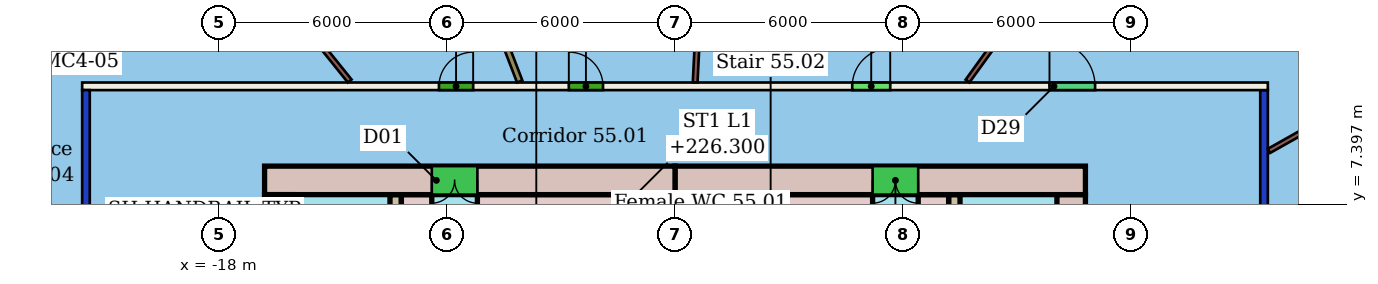
"""IFC4 building model, lengths in metres.
Left out: names, types, materials, properties, quantities, classifications, styles, units other than length and angle.
Written with IfcOpenShell. Run it as: python <this file> out.ifc"""

import sys

from ifc_helpers import new_model, si_unit, direction, frame, frame_2d, origin, place, context, subcontext, project, spatial, rectangle, extrude, element, fill, save


model = new_model("IFC4")
c1 = context("Model", 3, precision=1e-05, world=origin(), true_north=direction((0.0, 1.0)))
c2 = subcontext(c1, "Body", "Model", "MODEL_VIEW")
j1 = project(units=[si_unit("LENGTHUNIT", "METRE"), si_unit("PLANEANGLEUNIT", "RADIAN")], contexts=[c1])
p1 = place(None, origin())
s1 = spatial("IfcSite", under=j1, at=p1, CompositionType="ELEMENT")
p2 = place(p1, origin())
s2 = spatial("IfcBuilding", under=s1, at=p2, CompositionType="ELEMENT")
p3 = place(p2, frame((0.0, 0.0, 224.5)))
s3 = spatial("IfcBuildingStorey", under=s2, at=p3, CompositionType="ELEMENT", Elevation=224.5)
p4 = place(p3, frame((-21.5, -10.4, 0.0), z_axis=(0.0, 0.0, 1.0), x_axis=(0.0, 1.0, 0.0)))
e1 = element("IfcWall", 1, at=p4, inside=s3, PredefinedType="PARTITIONING", context=c2, shape_type="SweptSolid", body=[
    extrude(rectangle(XDim=20.8, YDim=0.2, at=frame_2d((10.4, 0.0))), origin(), (0.0, 0.0, 1.0), 3.05),
])
p5 = place(p4, frame((14.754, 0.0, 0.0)))
e2 = element("IfcOpeningElement", 2, at=p5, cuts=e1, PredefinedType="OPENING", context=c2, shape_type="SweptSolid", body=[
    extrude(rectangle(XDim=1.0, YDim=2.4, at=frame_2d((0.5, 1.2))), frame((0.0, 0.11, 0.0), z_axis=(0.0, -1.0, 0.0), x_axis=(1.0, 0.0, 0.0)), (0.0, 0.0, 1.0), 0.22),
])
p6 = place(p4, frame((7.034, 0.0, 0.0)))
e3 = element("IfcOpeningElement", 3, at=p6, cuts=e1, PredefinedType="OPENING", context=c2, shape_type="SweptSolid", body=[
    extrude(rectangle(XDim=1.8, YDim=2.4, at=frame_2d((0.9, 1.2))), frame((0.0, 0.11, 0.0), z_axis=(0.0, -1.0, 0.0), x_axis=(1.0, 0.0, 0.0)), (0.0, 0.0, 1.0), 0.22),
])
p7 = place(p3, frame((-21.6, 10.5, 0.0), z_axis=(0.0, 0.0, 1.0), x_axis=(1.0, 0.0, 0.0)))
e4 = element("IfcWall", 4, at=p7, inside=s3, PredefinedType="PARTITIONING", context=c2, shape_type="SweptSolid", body=[
    extrude(rectangle(XDim=31.2, YDim=0.2, at=frame_2d((15.6, 0.0))), origin(), (0.0, 0.0, 1.0), 3.45),
])
p8 = place(p7, frame((20.263, 0.0, 0.0)))
e5 = element("IfcOpeningElement", 5, at=p8, cuts=e4, PredefinedType="OPENING", context=c2, shape_type="SweptSolid", body=[
    extrude(rectangle(XDim=1.0, YDim=2.4, at=frame_2d((0.5, 1.2))), frame((0.0, 0.11, 0.0), z_axis=(0.0, -1.0, 0.0), x_axis=(1.0, 0.0, 0.0)), (0.0, 0.0, 1.0), 0.22),
])
p9 = place(p7, frame((12.806, 0.0, 0.0)))
e6 = element("IfcOpeningElement", 6, at=p9, cuts=e4, PredefinedType="OPENING", context=c2, shape_type="SweptSolid", body=[
    extrude(rectangle(XDim=0.9, YDim=2.1, at=frame_2d((0.45, 1.05))), frame((0.0, 0.11, 0.0), z_axis=(0.0, -1.0, 0.0), x_axis=(1.0, 0.0, 0.0)), (0.0, 0.0, 1.0), 0.22),
])
p10 = place(p7, frame((9.389, 0.0, 0.0)))
e7 = element("IfcOpeningElement", 7, at=p10, cuts=e4, PredefinedType="OPENING", context=c2, shape_type="SweptSolid", body=[
    extrude(rectangle(XDim=0.9, YDim=2.1, at=frame_2d((0.45, 1.05))), frame((0.0, 0.11, 0.0), z_axis=(0.0, -1.0, 0.0), x_axis=(1.0, 0.0, 0.0)), (0.0, 0.0, 1.0), 0.22),
])
p11 = place(p7, frame((25.454, 0.0, 0.0)))
e8 = element("IfcOpeningElement", 8, at=p11, cuts=e4, PredefinedType="OPENING", context=c2, shape_type="SweptSolid", body=[
    extrude(rectangle(XDim=1.2, YDim=2.4, at=frame_2d((0.6, 1.2))), frame((0.0, 0.11, 0.0), z_axis=(0.0, -1.0, 0.0), x_axis=(1.0, 0.0, 0.0)), (0.0, 0.0, 1.0), 0.22),
])
p12 = place(p3, frame((9.5, 10.4, 0.0), z_axis=(0.0, 0.0, 1.0), x_axis=(0.0, -1.0, 0.0)))
e9 = element("IfcWall", 9, at=p12, inside=s3, PredefinedType="PARTITIONING", context=c2, shape_type="SweptSolid", body=[
    extrude(rectangle(XDim=20.8, YDim=0.2, at=frame_2d((10.4, 0.0))), origin(), (0.0, 0.0, 1.0), 3.05),
])
p13 = place(p12, frame((13.631, 0.0, 0.0)))
e10 = element("IfcOpeningElement", 10, at=p13, cuts=e9, PredefinedType="OPENING", context=c2, shape_type="SweptSolid", body=[
    extrude(rectangle(XDim=0.9, YDim=2.1, at=frame_2d((0.45, 1.05))), frame((0.0, 0.11, 0.0), z_axis=(0.0, -1.0, 0.0), x_axis=(1.0, 0.0, 0.0)), (0.0, 0.0, 1.0), 0.22),
])
p14 = place(p12, frame((7.823, 0.0, 0.0)))
e11 = element("IfcOpeningElement", 11, at=p14, cuts=e9, PredefinedType="OPENING", context=c2, shape_type="SweptSolid", body=[
    extrude(rectangle(XDim=1.5, YDim=2.1, at=frame_2d((0.75, 1.05))), frame((0.0, 0.11, 0.0), z_axis=(0.0, -1.0, 0.0), x_axis=(1.0, 0.0, 0.0)), (0.0, 0.0, 1.0), 0.22),
])
p15 = place(p3, frame((9.588, 21.542, 0.0), z_axis=(0.0, 0.0, 1.0), x_axis=(-0.586235299026, -0.810140836013, 0.0)))
e12 = element("IfcWall", 12, at=p15, inside=s3, PredefinedType="PARTITIONING", context=c2, shape_type="SweptSolid", body=[
    extrude(rectangle(XDim=13.461, YDim=0.125, at=frame_2d((6.73, 0.0))), origin(), (0.0, 0.0, 1.0), 3.45),
])
p16 = place(p3, frame((-4.783, 24.319, 0.0), z_axis=(0.0, 0.0, 1.0), x_axis=(-0.049956237306, -0.998751407686, 0.0)))
e13 = element("IfcWall", 13, at=p16, inside=s3, PredefinedType="PARTITIONING", context=c2, shape_type="SweptSolid", body=[
    extrude(rectangle(XDim=13.733, YDim=0.125, at=frame_2d((6.866, 0.0))), origin(), (0.0, 0.0, 1.0), 3.45),
])
p17 = place(p3, frame((-14.097, 21.057, 0.0), z_axis=(0.0, 0.0, 1.0), x_axis=(0.358907338181, -0.93337319578, 0.0)))
e14 = element("IfcWall", 14, at=p17, inside=s3, PredefinedType="PARTITIONING", context=c2, shape_type="SweptSolid", body=[
    extrude(rectangle(XDim=11.174, YDim=0.15, at=frame_2d((5.587, 0.0))), origin(), (0.0, 0.0, 1.0), 3.45),
])
p18 = place(p3, frame((-19.706, 17.038, 0.0), z_axis=(0.0, 0.0, 1.0), x_axis=(0.626795529624, -0.77918378066, 0.0)))
e15 = element("IfcWall", 15, at=p18, inside=s3, PredefinedType="PARTITIONING", context=c2, shape_type="SweptSolid", body=[
    extrude(rectangle(XDim=8.212, YDim=0.125, at=frame_2d((4.106, 0.0))), origin(), (0.0, 0.0, 1.0), 3.45),
])
p19 = place(p3, frame((16.664, 12.761, 0.0), z_axis=(0.0, 0.0, 1.0), x_axis=(-0.871369479299, -0.490627384627, 0.0)))
e16 = element("IfcWall", 16, at=p19, inside=s3, PredefinedType="PARTITIONING", context=c2, shape_type="SweptSolid", body=[
    extrude(rectangle(XDim=8.072, YDim=0.125, at=frame_2d((4.036, 0.0))), origin(), (0.0, 0.0, 1.0), 3.45),
])
p20 = place(p3, frame((4.8, 8.025, 0.0), z_axis=(0.0, 0.0, 1.0), x_axis=(-1.0, 0.0, 0.0)))
e17 = element("IfcWall", 17, at=p20, inside=s3, PredefinedType="SHEAR", context=c2, shape_type="SweptSolid", body=[
    extrude(rectangle(XDim=10.8, YDim=0.75, at=frame_2d((5.4, 0.0))), origin(), (0.0, 0.0, 1.0), 3.3),
])
p21 = place(p20, frame((4.4, 0.0, 0.0)))
e18 = element("IfcOpeningElement", 18, at=p21, cuts=e17, PredefinedType="OPENING", context=c2, shape_type="SweptSolid", body=[
    extrude(rectangle(XDim=1.2, YDim=2.1, at=frame_2d((0.6, 1.05))), frame((0.0, 0.385, 0.0), z_axis=(0.0, -1.0, 0.0), x_axis=(1.0, 0.0, 0.0)), (0.0, 0.0, 1.0), 0.77),
])
p22 = place(p3, frame((-6.0, 8.025, 0.0), z_axis=(0.0, 0.0, 1.0), x_axis=(-1.0, 0.0, 0.0)))
e19 = element("IfcWall", 19, at=p22, inside=s3, PredefinedType="SHEAR", context=c2, shape_type="SweptSolid", body=[
    extrude(rectangle(XDim=10.8, YDim=0.75, at=frame_2d((5.4, 0.0))), origin(), (0.0, 0.0, 1.0), 3.3),
])
p23 = place(p22, frame((5.2, 0.0, 0.0)))
e20 = element("IfcOpeningElement", 20, at=p23, cuts=e19, PredefinedType="OPENING", context=c2, shape_type="SweptSolid", body=[
    extrude(rectangle(XDim=1.2, YDim=2.1, at=frame_2d((0.6, 1.05))), frame((0.0, 0.385, 0.0), z_axis=(0.0, -1.0, 0.0), x_axis=(1.0, 0.0, 0.0)), (0.0, 0.0, 1.0), 0.77),
])
p24 = place(p3, frame((-16.425, 7.65, 0.0), z_axis=(0.0, 0.0, 1.0), x_axis=(0.0, -1.0, 0.0)))
e21 = element("IfcWall", 21, at=p24, inside=s3, PredefinedType="SHEAR", context=c2, shape_type="SweptSolid", body=[
    extrude(rectangle(XDim=15.3, YDim=0.75, at=frame_2d((7.65, 0.0))), origin(), (0.0, 0.0, 1.0), 3.3),
])
p25 = place(p24, frame((11.25, 0.0, 0.0)))
e22 = element("IfcOpeningElement", 22, at=p25, cuts=e21, PredefinedType="OPENING", context=c2, shape_type="SweptSolid", body=[
    extrude(rectangle(XDim=1.2, YDim=2.1, at=frame_2d((0.6, 1.05))), frame((0.0, 0.385, 0.0), z_axis=(0.0, -1.0, 0.0), x_axis=(1.0, 0.0, 0.0)), (0.0, 0.0, 1.0), 0.77),
])
p26 = place(p24, frame((2.85, 0.0, 0.0)))
e23 = element("IfcOpeningElement", 23, at=p26, cuts=e21, PredefinedType="OPENING", context=c2, shape_type="SweptSolid", body=[
    extrude(rectangle(XDim=1.2, YDim=2.1, at=frame_2d((0.6, 1.05))), frame((0.0, 0.385, 0.0), z_axis=(0.0, -1.0, 0.0), x_axis=(1.0, 0.0, 0.0)), (0.0, 0.0, 1.0), 0.77),
])
p27 = place(p3, frame((4.425, -7.65, 0.0), z_axis=(0.0, 0.0, 1.0), x_axis=(0.0, 1.0, 0.0)))
e24 = element("IfcWall", 24, at=p27, inside=s3, PredefinedType="SHEAR", context=c2, shape_type="SweptSolid", body=[
    extrude(rectangle(XDim=15.3, YDim=0.75, at=frame_2d((7.65, 0.0))), origin(), (0.0, 0.0, 1.0), 3.3),
])
p28 = place(p27, frame((2.85, 0.0, 0.0)))
e25 = element("IfcOpeningElement", 25, at=p28, cuts=e24, PredefinedType="OPENING", context=c2, shape_type="SweptSolid", body=[
    extrude(rectangle(XDim=1.2, YDim=2.1, at=frame_2d((0.6, 1.05))), frame((0.0, 0.385, 0.0), z_axis=(0.0, -1.0, 0.0), x_axis=(1.0, 0.0, 0.0)), (0.0, 0.0, 1.0), 0.77),
])
p29 = place(p27, frame((11.25, 0.0, 0.0)))
e26 = element("IfcOpeningElement", 26, at=p29, cuts=e24, PredefinedType="OPENING", context=c2, shape_type="SweptSolid", body=[
    extrude(rectangle(XDim=1.2, YDim=2.1, at=frame_2d((0.6, 1.05))), frame((0.0, 0.385, 0.0), z_axis=(0.0, -1.0, 0.0), x_axis=(1.0, 0.0, 0.0)), (0.0, 0.0, 1.0), 0.77),
])
p30 = place(p3, frame((-13.35, 7.65, 0.0), z_axis=(0.0, 0.0, 1.0), x_axis=(0.0, -1.0, 0.0)))
e27 = element("IfcWall", 27, at=p30, inside=s3, PredefinedType="SHEAR", context=c2, shape_type="SweptSolid", body=[
    extrude(rectangle(XDim=15.3, YDim=0.3, at=frame_2d((7.65, 0.0))), origin(), (0.0, 0.0, 1.0), 3.3),
])
p31 = place(p30, frame((6.9, 0.0, 0.0)))
e28 = element("IfcOpeningElement", 28, at=p31, cuts=e27, PredefinedType="OPENING", context=c2, shape_type="SweptSolid", body=[
    extrude(rectangle(XDim=1.5, YDim=2.1, at=frame_2d((0.75, 1.05))), frame((0.0, 0.16, 0.0), z_axis=(0.0, -1.0, 0.0), x_axis=(1.0, 0.0, 0.0)), (0.0, 0.0, 1.0), 0.32),
])
p32 = place(p3, frame((1.35, -7.65, 0.0), z_axis=(0.0, 0.0, 1.0), x_axis=(0.0, 1.0, 0.0)))
e29 = element("IfcWall", 29, at=p32, inside=s3, PredefinedType="SHEAR", context=c2, shape_type="SweptSolid", body=[
    extrude(rectangle(XDim=15.3, YDim=0.3, at=frame_2d((7.65, 0.0))), origin(), (0.0, 0.0, 1.0), 3.3),
])
p33 = place(p32, frame((1.56, 0.0, 0.0)))
e30 = element("IfcOpeningElement", 30, at=p33, cuts=e29, PredefinedType="OPENING", context=c2, shape_type="SweptSolid", body=[
    extrude(rectangle(XDim=1.0, YDim=2.1, at=frame_2d((0.5, 1.05))), frame((0.0, 0.16, 0.0), z_axis=(0.0, -1.0, 0.0), x_axis=(1.0, 0.0, 0.0)), (0.0, 0.0, 1.0), 0.32),
])
p34 = place(p32, frame((6.9, 0.0, 0.0)))
e31 = element("IfcOpeningElement", 31, at=p34, cuts=e29, PredefinedType="OPENING", context=c2, shape_type="SweptSolid", body=[
    extrude(rectangle(XDim=1.5, YDim=2.1, at=frame_2d((0.75, 1.05))), frame((0.0, 0.16, 0.0), z_axis=(0.0, -1.0, 0.0), x_axis=(1.0, 0.0, 0.0)), (0.0, 0.0, 1.0), 0.32),
])
p35 = place(p3, frame((-6.0, 3.88, 0.0), z_axis=(0.0, 0.0, 1.0), x_axis=(0.0, 1.0, 0.0)))
e32 = element("IfcWall", 32, at=p35, inside=s3, PredefinedType="SHEAR", context=c2, shape_type="SweptSolid", body=[
    extrude(rectangle(XDim=3.77, YDim=0.3, at=frame_2d((1.885, 0.0))), origin(), (0.0, 0.0, 1.0), 3.3),
])
p36 = place(p3, frame((-13.2, 7.475, 0.0), z_axis=(0.0, 0.0, 1.0), x_axis=(1.0, 0.0, 0.0)))
e33 = element("IfcWall", 33, at=p36, inside=s3, PredefinedType="SHEAR", context=c2, shape_type="SweptSolid", body=[
    extrude(rectangle(XDim=0.8, YDim=0.35, at=frame_2d((0.4, 0.0))), origin(), (0.0, 0.0, 1.0), 3.3),
])
for number, where, z_axis, x_axis in (
    (34, (-11.2, 7.475, 0.0), (0.0, 0.0, 1.0), (1.0, 0.0, 0.0)),
    (35, (-5.85, 7.475, 0.0), (0.0, 0.0, 1.0), (1.0, 0.0, 0.0)),
):
    element("IfcWall", number, at=place(p3, frame(where, z_axis=z_axis, x_axis=x_axis)), inside=s3, PredefinedType="SHEAR", context=c2, shape_type="SweptSolid", body=[
        extrude(rectangle(XDim=5.05, YDim=0.35, at=frame_2d((2.525, 0.0))), origin(), (0.0, 0.0, 1.0), 3.3),
    ])
p37 = place(p3, frame((0.4, 7.475, 0.0), z_axis=(0.0, 0.0, 1.0), x_axis=(1.0, 0.0, 0.0)))
e36 = element("IfcWall", 36, at=p37, inside=s3, PredefinedType="SHEAR", context=c2, shape_type="SweptSolid", body=[
    extrude(rectangle(XDim=0.8, YDim=0.35, at=frame_2d((0.4, 0.0))), origin(), (0.0, 0.0, 1.0), 3.3),
])
p38 = place(p8, origin())
e37 = element("IfcDoor", 37, at=p38, inside=s3, OperationType="SINGLE_SWING_RIGHT", PredefinedType="DOOR", context=c2, shape_type="SweptSolid", body=[
    extrude(rectangle(XDim=1.0, YDim=2.4, at=frame_2d((0.5, 1.2))), frame((0.0, 0.025, 0.0), z_axis=(0.0, -1.0, 0.0), x_axis=(1.0, 0.0, 0.0)), (0.0, 0.0, 1.0), 0.05),
])
fill(e5, e37)
p39 = place(p9, origin())
e38 = element("IfcDoor", 38, at=p39, inside=s3, OperationType="SINGLE_SWING_LEFT", PredefinedType="DOOR", context=c2, shape_type="SweptSolid", body=[
    extrude(rectangle(XDim=0.9, YDim=2.1, at=frame_2d((0.45, 1.05))), frame((0.0, 0.025, 0.0), z_axis=(0.0, -1.0, 0.0), x_axis=(1.0, 0.0, 0.0)), (0.0, 0.0, 1.0), 0.05),
])
fill(e6, e38)
p40 = place(p10, origin())
e39 = element("IfcDoor", 39, at=p40, inside=s3, OperationType="SINGLE_SWING_RIGHT", PredefinedType="DOOR", context=c2, shape_type="SweptSolid", body=[
    extrude(rectangle(XDim=0.9, YDim=2.1, at=frame_2d((0.45, 1.05))), frame((0.0, 0.025, 0.0), z_axis=(0.0, -1.0, 0.0), x_axis=(1.0, 0.0, 0.0)), (0.0, 0.0, 1.0), 0.05),
])
fill(e7, e39)
p41 = place(p11, origin())
e40 = element("IfcDoor", 40, at=p41, inside=s3, OperationType="SINGLE_SWING_LEFT", PredefinedType="DOOR", context=c2, shape_type="SweptSolid", body=[
    extrude(rectangle(XDim=1.2, YDim=2.4, at=frame_2d((0.6, 1.2))), frame((0.0, 0.025, 0.0), z_axis=(0.0, -1.0, 0.0), x_axis=(1.0, 0.0, 0.0)), (0.0, 0.0, 1.0), 0.05),
])
fill(e8, e40)
p42 = place(p21, origin())
e41 = element("IfcDoor", 41, at=p42, inside=s3, OperationType="DOUBLE_DOOR_SINGLE_SWING", PredefinedType="NOTDEFINED", context=c2, shape_type="SweptSolid", body=[
    extrude(rectangle(XDim=1.2, YDim=2.1, at=frame_2d((0.6, 1.05))), frame((0.0, 0.025, 0.0), z_axis=(0.0, -1.0, 0.0), x_axis=(1.0, 0.0, 0.0)), (0.0, 0.0, 1.0), 0.05),
])
fill(e18, e41)
p43 = place(p23, origin())
e42 = element("IfcDoor", 42, at=p43, inside=s3, OperationType="DOUBLE_DOOR_SINGLE_SWING", PredefinedType="NOTDEFINED", context=c2, shape_type="SweptSolid", body=[
    extrude(rectangle(XDim=1.2, YDim=2.1, at=frame_2d((0.6, 1.05))), frame((0.0, 0.025, 0.0), z_axis=(0.0, -1.0, 0.0), x_axis=(1.0, 0.0, 0.0)), (0.0, 0.0, 1.0), 0.05),
])
fill(e20, e42)
save(model, sys.argv[1])
